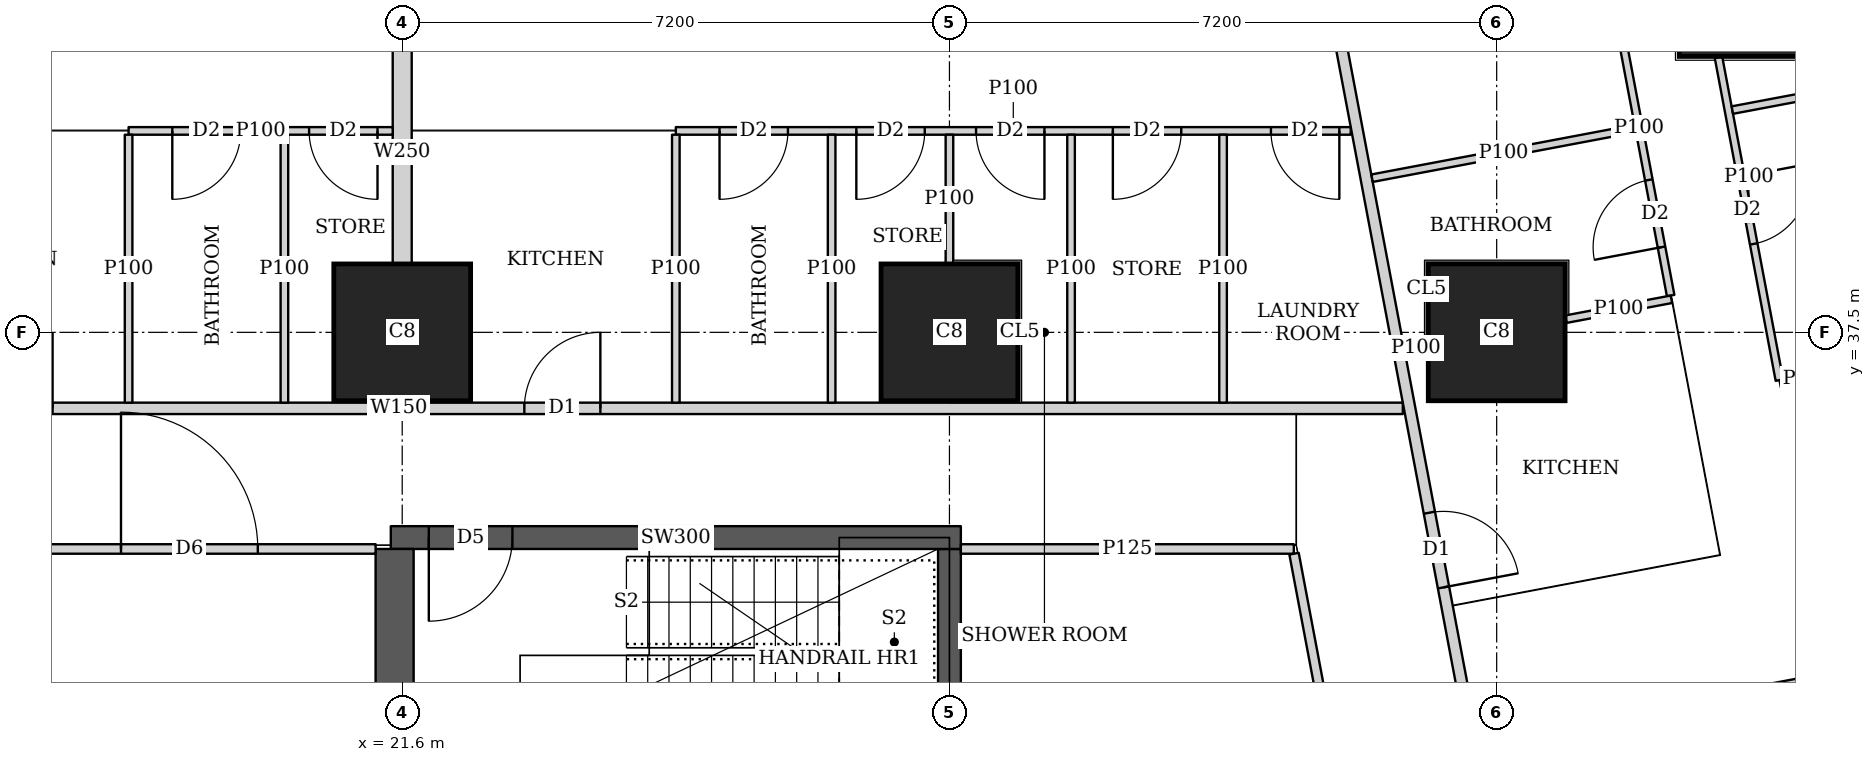
"""IFC4 building model, lengths in metres.
Left out: names, types, materials, properties, quantities, classifications, styles, units other than length and angle.
Written with IfcOpenShell. Run it as: python <this file> out.ifc"""

import sys

from ifc_helpers import new_model, si_unit, direction, frame, frame_2d, origin, origin_2d, place, context, subcontext, project, spatial, rectangle, extrude, element, fill, save


model = new_model("IFC4")
c1 = context("Model", 3, precision=1e-05, world=origin(), true_north=direction((0.0, 1.0)))
c2 = subcontext(c1, "Body", "Model", "MODEL_VIEW")
j1 = project(units=[si_unit("LENGTHUNIT", "METRE"), si_unit("PLANEANGLEUNIT", "RADIAN")], contexts=[c1])
p1 = place(None, origin())
s1 = spatial("IfcSite", under=j1, at=p1, CompositionType="ELEMENT")
p2 = place(p1, origin())
s2 = spatial("IfcBuilding", under=s1, at=p2, CompositionType="ELEMENT")
p3 = place(p2, frame((0.0, 0.0, 20.0)))
s3 = spatial("IfcBuildingStorey", under=s2, at=p3, CompositionType="ELEMENT", Elevation=20.0)
for number, where, z_axis, x_axis in (
    (1, (21.6, 37.5, 0.0), (0.0, 0.0, 1.0), (1.0, 0.0, 0.0)),
    (2, (28.8, 37.5, 0.0), (0.0, 0.0, 1.0), (1.0, 0.0, 0.0)),
    (3, (36.0, 37.5, 0.0), (0.0, 0.0, 1.0), (1.0, 0.0, 0.0)),
):
    element("IfcColumn", number, at=place(p3, frame(where, z_axis=z_axis, x_axis=x_axis)), inside=s3, PredefinedType="COLUMN", context=c2, shape_type="SweptSolid", body=[
        extrude(rectangle(XDim=1.8, YDim=1.8, at=origin_2d()), origin(), (0.0, 0.0, 1.0), 3.75),
    ])
p4 = place(p3, frame((40.102, 42.83, 0.0), z_axis=(0.0, 0.0, 1.0), x_axis=(1.0, 0.0, 0.0)))
e4 = element("IfcColumn", 4, at=p4, inside=s3, PredefinedType="COLUMN", context=c2, shape_type="SweptSolid", body=[
    extrude(rectangle(XDim=3.4, YDim=3.4, at=origin_2d()), origin(), (0.0, 0.0, 1.0), 3.75),
])
p5 = place(p3, frame((21.45, 34.8, 0.0), z_axis=(0.0, 0.0, 1.0), x_axis=(1.0, 0.0, 0.0)))
e5 = element("IfcWall", 5, at=p5, inside=s3, PredefinedType="SHEAR", context=c2, shape_type="SweptSolid", body=[
    extrude(rectangle(XDim=7.5, YDim=0.3, at=frame_2d((3.75, 0.0))), origin(), (0.0, 0.0, 1.0), 3.75),
])
p6 = place(p5, frame((0.5, 0.0, 0.0)))
e6 = element("IfcOpeningElement", 6, at=p6, cuts=e5, PredefinedType="OPENING", context=c2, shape_type="SweptSolid", body=[
    extrude(rectangle(XDim=1.1, YDim=2.1, at=frame_2d((0.55, 1.05))), frame((0.0, 0.16, 0.0), z_axis=(0.0, -1.0, 0.0), x_axis=(1.0, 0.0, 0.0)), (0.0, 0.0, 1.0), 0.32),
])
p7 = place(p3, frame((21.5, 30.45, 0.0), z_axis=(0.0, 0.0, 1.0), x_axis=(0.0, 1.0, 0.0)))
e7 = element("IfcWall", 7, at=p7, inside=s3, PredefinedType="SHEAR", context=c2, shape_type="SweptSolid", body=[
    extrude(rectangle(XDim=4.2, YDim=0.5, at=frame_2d((2.1, 0.0))), origin(), (0.0, 0.0, 1.0), 3.75),
])
p8 = place(p3, frame((28.8, 30.45, 0.0), z_axis=(0.0, 0.0, 1.0), x_axis=(0.0, 1.0, 0.0)))
e8 = element("IfcWall", 8, at=p8, inside=s3, PredefinedType="SHEAR", context=c2, shape_type="SweptSolid", body=[
    extrude(rectangle(XDim=4.2, YDim=0.3, at=frame_2d((2.1, 0.0))), origin(), (0.0, 0.0, 1.0), 3.75),
])
p9 = place(p3, frame((8.35, 36.5, 0.0), z_axis=(0.0, 0.0, 1.0), x_axis=(1.0, 0.0, 0.0)))
e9 = element("IfcWall", 9, at=p9, inside=s3, PredefinedType="SOLIDWALL", context=c2, shape_type="SweptSolid", body=[
    extrude(rectangle(XDim=26.415, YDim=0.15, at=frame_2d((13.208, 0.0))), origin(), (0.0, 0.0, 1.0), 3.5),
])
p10 = place(p9, frame((3.383, 0.0, 0.0)))
e10 = element("IfcOpeningElement", 10, at=p10, cuts=e9, PredefinedType="OPENING", context=c2, shape_type="SweptSolid", body=[
    extrude(rectangle(XDim=1.0, YDim=2.1, at=frame_2d((0.5, 1.05))), frame((0.0, 0.085, 0.0), z_axis=(0.0, -1.0, 0.0), x_axis=(1.0, 0.0, 0.0)), (0.0, 0.0, 1.0), 0.17),
])
p11 = place(p9, frame((7.65, 0.0, 0.0)))
e11 = element("IfcOpeningElement", 11, at=p11, cuts=e9, PredefinedType="OPENING", context=c2, shape_type="SweptSolid", body=[
    extrude(rectangle(XDim=1.0, YDim=2.1, at=frame_2d((0.5, 1.05))), frame((0.0, 0.085, 0.0), z_axis=(0.0, -1.0, 0.0), x_axis=(1.0, 0.0, 0.0)), (0.0, 0.0, 1.0), 0.17),
])
p12 = place(p9, frame((14.857, 0.0, 0.0)))
e12 = element("IfcOpeningElement", 12, at=p12, cuts=e9, PredefinedType="OPENING", context=c2, shape_type="SweptSolid", body=[
    extrude(rectangle(XDim=1.0, YDim=2.1, at=frame_2d((0.5, 1.05))), frame((0.0, 0.085, 0.0), z_axis=(0.0, -1.0, 0.0), x_axis=(1.0, 0.0, 0.0)), (0.0, 0.0, 1.0), 0.17),
])
p13 = place(p3, frame((33.755, 42.325, 0.0), z_axis=(0.0, 0.0, 1.0), x_axis=(0.185611461091, -0.982623216453, 0.0)))
e13 = element("IfcWall", 13, at=p13, inside=s3, PredefinedType="SOLIDWALL", context=c2, shape_type="SweptSolid", body=[
    extrude(rectangle(XDim=40.241, YDim=0.15, at=frame_2d((20.121, 0.0))), origin(), (0.0, 0.0, 1.0), 2.5),
])
p14 = place(p13, frame((7.325, 0.0, 0.0)))
e14 = element("IfcOpeningElement", 14, at=p14, cuts=e13, PredefinedType="OPENING", context=c2, shape_type="SweptSolid", body=[
    extrude(rectangle(XDim=1.0, YDim=2.1, at=frame_2d((0.5, 1.05))), frame((0.0, 0.085, 0.0), z_axis=(0.0, -1.0, 0.0), x_axis=(1.0, 0.0, 0.0)), (0.0, 0.0, 1.0), 0.17),
])
p15 = place(p13, frame((11.902, 0.0, 0.0)))
e15 = element("IfcOpeningElement", 15, at=p15, cuts=e13, PredefinedType="OPENING", context=c2, shape_type="SweptSolid", body=[
    extrude(rectangle(XDim=1.0, YDim=2.1, at=frame_2d((0.5, 1.05))), frame((0.0, 0.085, 0.0), z_axis=(0.0, -1.0, 0.0), x_axis=(1.0, 0.0, 0.0)), (0.0, 0.0, 1.0), 0.17),
])
p16 = place(p13, frame((25.718, 0.0, 0.0)))
e16 = element("IfcOpeningElement", 16, at=p16, cuts=e13, PredefinedType="OPENING", context=c2, shape_type="SweptSolid", body=[
    extrude(rectangle(XDim=1.0, YDim=2.1, at=frame_2d((0.5, 1.05))), frame((0.0, 0.085, 0.0), z_axis=(0.0, -1.0, 0.0), x_axis=(1.0, 0.0, 0.0)), (0.0, 0.0, 1.0), 0.17),
])
p17 = place(p13, frame((31.788, 0.0, 0.0)))
e17 = element("IfcOpeningElement", 17, at=p17, cuts=e13, PredefinedType="OPENING", context=c2, shape_type="SweptSolid", body=[
    extrude(rectangle(XDim=1.0, YDim=2.1, at=frame_2d((0.5, 1.05))), frame((0.0, 0.085, 0.0), z_axis=(0.0, -1.0, 0.0), x_axis=(1.0, 0.0, 0.0)), (0.0, 0.0, 1.0), 0.17),
])
p18 = place(p3, frame((38.918, 41.12, 0.0), z_axis=(0.0, 0.0, 1.0), x_axis=(0.185474723155, -0.982649035552, 0.0)))
e18 = element("IfcWall", 18, at=p18, inside=s3, PredefinedType="PARTITIONING", context=c2, shape_type="SweptSolid", body=[
    extrude(rectangle(XDim=4.324, YDim=0.1, at=frame_2d((2.162, 0.0))), origin(), (0.0, 0.0, 1.0), 3.5),
])
p19 = place(p18, frame((1.6, 0.0, 0.0)))
e19 = element("IfcOpeningElement", 19, at=p19, cuts=e18, PredefinedType="OPENING", context=c2, shape_type="SweptSolid", body=[
    extrude(rectangle(XDim=0.9, YDim=2.1, at=frame_2d((0.45, 1.05))), frame((0.0, 0.06, 0.0), z_axis=(0.0, -1.0, 0.0), x_axis=(1.0, 0.0, 0.0)), (0.0, 0.0, 1.0), 0.12),
])
p20 = place(p3, frame((37.457, 42.39, 0.0), z_axis=(0.0, 0.0, 1.0), x_axis=(0.185560627322, -0.982632817276, 0.0)))
e20 = element("IfcWall", 20, at=p20, inside=s3, PredefinedType="PARTITIONING", context=c2, shape_type="SweptSolid", body=[
    extrude(rectangle(XDim=4.484, YDim=0.1, at=frame_2d((2.242, 0.0))), origin(), (0.0, 0.0, 1.0), 3.5),
])
p21 = place(p20, frame((2.936, 0.0, 0.0)))
e21 = element("IfcOpeningElement", 21, at=p21, cuts=e20, PredefinedType="OPENING", context=c2, shape_type="SweptSolid", body=[
    extrude(rectangle(XDim=0.9, YDim=2.1, at=frame_2d((0.45, 1.05))), frame((0.0, 0.06, 0.0), z_axis=(0.0, -1.0, 0.0), x_axis=(1.0, 0.0, 0.0)), (0.0, 0.0, 1.0), 0.12),
])
p22 = place(p3, frame((43.277, 41.212, 0.0), z_axis=(0.0, 0.0, 1.0), x_axis=(-0.982665405803, -0.185387972203, 0.0)))
e22 = element("IfcWall", 22, at=p22, inside=s3, PredefinedType="PARTITIONING", context=c2, shape_type="SweptSolid", body=[
    extrude(rectangle(XDim=4.25, YDim=0.1, at=frame_2d((2.125, 0.0))), origin(), (0.0, 0.0, 1.0), 2.1),
])
p23 = place(p3, frame((40.454, 36.959, 0.0), z_axis=(0.0, 0.0, 1.0), x_axis=(-0.982578421631, -0.185848447247, 0.0)))
e23 = element("IfcWall", 23, at=p23, inside=s3, PredefinedType="PARTITIONING", context=c2, shape_type="SweptSolid", body=[
    extrude(rectangle(XDim=0.737, YDim=0.1, at=frame_2d((0.369, 0.0))), origin(), (0.0, 0.0, 1.0), 3.5),
])
p24 = place(p3, frame((37.823, 40.182, 0.0), z_axis=(0.0, 0.0, 1.0), x_axis=(-0.98263926043, -0.185526504472, 0.0)))
e24 = element("IfcWall", 24, at=p24, inside=s3, PredefinedType="PARTITIONING", context=c2, shape_type="SweptSolid", body=[
    extrude(rectangle(XDim=3.524, YDim=0.1, at=frame_2d((1.762, 0.0))), origin(), (0.0, 0.0, 1.0), 3.5),
])
p25 = place(p3, frame((38.299, 37.935, 0.0), z_axis=(0.0, 0.0, 1.0), x_axis=(-0.982680053146, -0.185310315822, 0.0)))
e25 = element("IfcWall", 25, at=p25, inside=s3, PredefinedType="PARTITIONING", context=c2, shape_type="SweptSolid", body=[
    extrude(rectangle(XDim=1.414, YDim=0.1, at=frame_2d((0.707, 0.0))), origin(), (0.0, 0.0, 1.0), 3.5),
])
p26 = place(p3, frame((35.09, 37.328, 0.0), z_axis=(0.0, 0.0, 1.0), x_axis=(-0.982961380226, -0.183812200315, 0.0)))
e26 = element("IfcWall", 26, at=p26, inside=s3, PredefinedType="PARTITIONING", context=c2, shape_type="SweptSolid", body=[
    extrude(rectangle(XDim=0.31, YDim=0.1, at=frame_2d((0.155, 0.0))), origin(), (0.0, 0.0, 1.0), 3.5),
])
p27 = place(p3, frame((40.468, 32.915, 0.0), z_axis=(0.0, 0.0, 1.0), x_axis=(-0.982635807605, -0.185544791394, 0.0)))
e27 = element("IfcWall", 27, at=p27, inside=s3, PredefinedType="SOLIDWALL", context=c2, shape_type="SweptSolid", body=[
    extrude(rectangle(XDim=4.775, YDim=0.25, at=frame_2d((2.388, 0.0))), origin(), (0.0, 0.0, 1.0), 3.5),
])
p28 = place(p3, frame((18.0, 40.15, 0.0), z_axis=(0.0, 0.0, 1.0), x_axis=(1.0, 0.0, 0.0)))
e28 = element("IfcWall", 28, at=p28, inside=s3, PredefinedType="PARTITIONING", context=c2, shape_type="SweptSolid", body=[
    extrude(rectangle(XDim=3.475, YDim=0.1, at=frame_2d((1.738, 0.0))), origin(), (0.0, 0.0, 1.0), 3.5),
])
p29 = place(p28, frame((0.575, 0.0, 0.0)))
e29 = element("IfcOpeningElement", 29, at=p29, cuts=e28, PredefinedType="OPENING", context=c2, shape_type="SweptSolid", body=[
    extrude(rectangle(XDim=0.9, YDim=2.1, at=frame_2d((0.45, 1.05))), frame((0.0, 0.06, 0.0), z_axis=(0.0, -1.0, 0.0), x_axis=(1.0, 0.0, 0.0)), (0.0, 0.0, 1.0), 0.12),
])
p30 = place(p28, frame((2.375, 0.0, 0.0)))
e30 = element("IfcOpeningElement", 30, at=p30, cuts=e28, PredefinedType="OPENING", context=c2, shape_type="SweptSolid", body=[
    extrude(rectangle(XDim=0.9, YDim=2.1, at=frame_2d((0.45, 1.05))), frame((0.0, 0.06, 0.0), z_axis=(0.0, -1.0, 0.0), x_axis=(1.0, 0.0, 0.0)), (0.0, 0.0, 1.0), 0.12),
])
for number, where, z_axis, x_axis in (
    (31, (18.0, 36.575, 0.0), (0.0, 0.0, 1.0), (0.0, 1.0, 0.0)),
    (32, (20.05, 36.575, 0.0), (0.0, 0.0, 1.0), (0.0, 1.0, 0.0)),
):
    element("IfcWall", number, at=place(p3, frame(where, z_axis=z_axis, x_axis=x_axis)), inside=s3, PredefinedType="PARTITIONING", context=c2, shape_type="SweptSolid", body=[
        extrude(rectangle(XDim=3.525, YDim=0.1, at=frame_2d((1.763, 0.0))), origin(), (0.0, 0.0, 1.0), 3.5),
    ])
p31 = place(p3, frame((25.2, 40.15, 0.0), z_axis=(0.0, 0.0, 1.0), x_axis=(1.0, 0.0, 0.0)))
e33 = element("IfcWall", 33, at=p31, inside=s3, PredefinedType="PARTITIONING", context=c2, shape_type="SweptSolid", body=[
    extrude(rectangle(XDim=8.88, YDim=0.1, at=frame_2d((4.44, 0.0))), origin(), (0.0, 0.0, 1.0), 3.5),
])
p32 = place(p31, frame((0.575, 0.0, 0.0)))
e34 = element("IfcOpeningElement", 34, at=p32, cuts=e33, PredefinedType="OPENING", context=c2, shape_type="SweptSolid", body=[
    extrude(rectangle(XDim=0.9, YDim=2.1, at=frame_2d((0.45, 1.05))), frame((0.0, 0.06, 0.0), z_axis=(0.0, -1.0, 0.0), x_axis=(1.0, 0.0, 0.0)), (0.0, 0.0, 1.0), 0.12),
])
p33 = place(p31, frame((3.95, 0.0, 0.0)))
e35 = element("IfcOpeningElement", 35, at=p33, cuts=e33, PredefinedType="OPENING", context=c2, shape_type="SweptSolid", body=[
    extrude(rectangle(XDim=0.9, YDim=2.1, at=frame_2d((0.45, 1.05))), frame((0.0, 0.06, 0.0), z_axis=(0.0, -1.0, 0.0), x_axis=(1.0, 0.0, 0.0)), (0.0, 0.0, 1.0), 0.12),
])
p34 = place(p31, frame((7.83, 0.0, 0.0)))
e36 = element("IfcOpeningElement", 36, at=p34, cuts=e33, PredefinedType="OPENING", context=c2, shape_type="SweptSolid", body=[
    extrude(rectangle(XDim=0.9, YDim=2.1, at=frame_2d((0.45, 1.05))), frame((0.0, 0.06, 0.0), z_axis=(0.0, -1.0, 0.0), x_axis=(1.0, 0.0, 0.0)), (0.0, 0.0, 1.0), 0.12),
])
p35 = place(p31, frame((2.375, 0.0, 0.0)))
e37 = element("IfcOpeningElement", 37, at=p35, cuts=e33, PredefinedType="OPENING", context=c2, shape_type="SweptSolid", body=[
    extrude(rectangle(XDim=0.9, YDim=2.1, at=frame_2d((0.45, 1.05))), frame((0.0, 0.06, 0.0), z_axis=(0.0, -1.0, 0.0), x_axis=(1.0, 0.0, 0.0)), (0.0, 0.0, 1.0), 0.12),
])
p36 = place(p31, frame((5.75, 0.0, 0.0)))
e38 = element("IfcOpeningElement", 38, at=p36, cuts=e33, PredefinedType="OPENING", context=c2, shape_type="SweptSolid", body=[
    extrude(rectangle(XDim=0.9, YDim=2.1, at=frame_2d((0.45, 1.05))), frame((0.0, 0.06, 0.0), z_axis=(0.0, -1.0, 0.0), x_axis=(1.0, 0.0, 0.0)), (0.0, 0.0, 1.0), 0.12),
])
p37 = place(p3, frame((25.2, 36.575, 0.0), z_axis=(0.0, 0.0, 1.0), x_axis=(0.0, 1.0, 0.0)))
e39 = element("IfcWall", 39, at=p37, inside=s3, PredefinedType="PARTITIONING", context=c2, shape_type="SweptSolid", body=[
    extrude(rectangle(XDim=3.525, YDim=0.1, at=frame_2d((1.763, 0.0))), origin(), (0.0, 0.0, 1.0), 3.5),
])
p38 = place(p3, frame((28.8, 38.401, 0.0), z_axis=(0.0, 0.0, 1.0), x_axis=(0.0, 1.0, 0.0)))
e40 = element("IfcWall", 40, at=p38, inside=s3, PredefinedType="PARTITIONING", context=c2, shape_type="SweptSolid", body=[
    extrude(rectangle(XDim=1.699, YDim=0.1, at=frame_2d((0.85, 0.0))), origin(), (0.0, 0.0, 1.0), 3.5),
])
for number, where, z_axis, x_axis in (
    (41, (32.4, 36.575, 0.0), (0.0, 0.0, 1.0), (0.0, 1.0, 0.0)),
    (42, (27.25, 36.575, 0.0), (0.0, 0.0, 1.0), (0.0, 1.0, 0.0)),
    (43, (30.4, 36.575, 0.0), (0.0, 0.0, 1.0), (0.0, 1.0, 0.0)),
):
    element("IfcWall", number, at=place(p3, frame(where, z_axis=z_axis, x_axis=x_axis)), inside=s3, PredefinedType="PARTITIONING", context=c2, shape_type="SweptSolid", body=[
        extrude(rectangle(XDim=3.525, YDim=0.1, at=frame_2d((1.763, 0.0))), origin(), (0.0, 0.0, 1.0), 3.5),
    ])
p39 = place(p3, frame((21.6, 38.401, 0.0), z_axis=(0.0, 0.0, 1.0), x_axis=(0.0, 1.0, 0.0)))
e44 = element("IfcWall", 44, at=p39, inside=s3, PredefinedType="SOLIDWALL", context=c2, shape_type="SweptSolid", body=[
    extrude(rectangle(XDim=2.949, YDim=0.25, at=frame_2d((1.475, 0.0))), origin(), (0.0, 0.0, 1.0), 3.5),
])
p40 = place(p3, frame((10.413, 34.65, 0.0), z_axis=(0.0, 0.0, 1.0), x_axis=(1.0, 0.0, 0.0)))
e45 = element("IfcWall", 45, at=p40, inside=s3, PredefinedType="PARTITIONING", context=c2, shape_type="SweptSolid", body=[
    extrude(rectangle(XDim=10.837, YDim=0.125, at=frame_2d((5.418, 0.0))), origin(), (0.0, 0.0, 1.0), 3.5),
])
p41 = place(p40, frame((7.487, 0.0, 0.0)))
e46 = element("IfcOpeningElement", 46, at=p41, cuts=e45, PredefinedType="OPENING", context=c2, shape_type="SweptSolid", body=[
    extrude(rectangle(XDim=1.8, YDim=2.1, at=frame_2d((0.9, 1.05))), frame((0.0, 0.073, 0.0), z_axis=(0.0, -1.0, 0.0), x_axis=(1.0, 0.0, 0.0)), (0.0, 0.0, 1.0), 0.145),
])
p42 = place(p3, frame((28.95, 34.65, 0.0), z_axis=(0.0, 0.0, 1.0), x_axis=(1.0, 0.0, 0.0)))
e47 = element("IfcWall", 47, at=p42, inside=s3, PredefinedType="PARTITIONING", context=c2, shape_type="SweptSolid", body=[
    extrude(rectangle(XDim=4.381, YDim=0.125, at=frame_2d((2.19, 0.0))), origin(), (0.0, 0.0, 1.0), 3.5),
])
p43 = place(p3, frame((34.193, 30.04, 0.0), z_axis=(0.0, 0.0, 1.0), x_axis=(-0.185626015863, 0.982620467034, 0.0)))
e48 = element("IfcWall", 48, at=p43, inside=s3, PredefinedType="PARTITIONING", context=c2, shape_type="SweptSolid", body=[
    extrude(rectangle(XDim=4.628, YDim=0.125, at=frame_2d((2.314, 0.0))), origin(), (0.0, 0.0, 1.0), 2.5),
])
p44 = place(p43, frame((1.15, 0.0, 0.0)))
e49 = element("IfcOpeningElement", 49, at=p44, cuts=e48, PredefinedType="OPENING", context=c2, shape_type="SweptSolid", body=[
    extrude(rectangle(XDim=1.0, YDim=2.1, at=frame_2d((0.5, 1.05))), frame((0.0, 0.073, 0.0), z_axis=(0.0, -1.0, 0.0), x_axis=(1.0, 0.0, 0.0)), (0.0, 0.0, 1.0), 0.145),
])
p45 = place(p19, origin())
e50 = element("IfcDoor", 50, at=p45, inside=s3, OperationType="SINGLE_SWING_LEFT", PredefinedType="DOOR", context=c2, shape_type="SweptSolid", body=[
    extrude(rectangle(XDim=0.9, YDim=2.1, at=frame_2d((0.45, 1.05))), frame((0.0, 0.025, 0.0), z_axis=(0.0, -1.0, 0.0), x_axis=(1.0, 0.0, 0.0)), (0.0, 0.0, 1.0), 0.05),
])
fill(e19, e50)
p46 = place(p21, origin())
e51 = element("IfcDoor", 51, at=p46, inside=s3, OperationType="SINGLE_SWING_LEFT", PredefinedType="DOOR", context=c2, shape_type="SweptSolid", body=[
    extrude(rectangle(XDim=0.9, YDim=2.1, at=frame_2d((0.45, 1.05))), frame((0.0, 0.025, 0.0), z_axis=(0.0, -1.0, 0.0), x_axis=(1.0, 0.0, 0.0)), (0.0, 0.0, 1.0), 0.05),
])
fill(e21, e51)
p47 = place(p14, origin())
e52 = element("IfcDoor", 52, at=p47, inside=s3, OperationType="SINGLE_SWING_RIGHT", PredefinedType="DOOR", context=c2, shape_type="SweptSolid", body=[
    extrude(rectangle(XDim=1.0, YDim=2.1, at=frame_2d((0.5, 1.05))), frame((0.0, 0.025, 0.0), z_axis=(0.0, -1.0, 0.0), x_axis=(1.0, 0.0, 0.0)), (0.0, 0.0, 1.0), 0.05),
])
fill(e14, e52)
p48 = place(p29, origin())
e53 = element("IfcDoor", 53, at=p48, inside=s3, OperationType="SINGLE_SWING_RIGHT", PredefinedType="DOOR", context=c2, shape_type="SweptSolid", body=[
    extrude(rectangle(XDim=0.9, YDim=2.1, at=frame_2d((0.45, 1.05))), frame((0.0, 0.025, 0.0), z_axis=(0.0, -1.0, 0.0), x_axis=(1.0, 0.0, 0.0)), (0.0, 0.0, 1.0), 0.05),
])
fill(e29, e53)
p49 = place(p30, origin())
e54 = element("IfcDoor", 54, at=p49, inside=s3, OperationType="SINGLE_SWING_LEFT", PredefinedType="DOOR", context=c2, shape_type="SweptSolid", body=[
    extrude(rectangle(XDim=0.9, YDim=2.1, at=frame_2d((0.45, 1.05))), frame((0.0, 0.025, 0.0), z_axis=(0.0, -1.0, 0.0), x_axis=(1.0, 0.0, 0.0)), (0.0, 0.0, 1.0), 0.05),
])
fill(e30, e54)
p50 = place(p32, origin())
e55 = element("IfcDoor", 55, at=p50, inside=s3, OperationType="SINGLE_SWING_RIGHT", PredefinedType="DOOR", context=c2, shape_type="SweptSolid", body=[
    extrude(rectangle(XDim=0.9, YDim=2.1, at=frame_2d((0.45, 1.05))), frame((0.0, 0.025, 0.0), z_axis=(0.0, -1.0, 0.0), x_axis=(1.0, 0.0, 0.0)), (0.0, 0.0, 1.0), 0.05),
])
fill(e34, e55)
p51 = place(p33, origin())
e56 = element("IfcDoor", 56, at=p51, inside=s3, OperationType="SINGLE_SWING_LEFT", PredefinedType="DOOR", context=c2, shape_type="SweptSolid", body=[
    extrude(rectangle(XDim=0.9, YDim=2.1, at=frame_2d((0.45, 1.05))), frame((0.0, 0.025, 0.0), z_axis=(0.0, -1.0, 0.0), x_axis=(1.0, 0.0, 0.0)), (0.0, 0.0, 1.0), 0.05),
])
fill(e35, e56)
p52 = place(p34, origin())
e57 = element("IfcDoor", 57, at=p52, inside=s3, OperationType="SINGLE_SWING_LEFT", PredefinedType="DOOR", context=c2, shape_type="SweptSolid", body=[
    extrude(rectangle(XDim=0.9, YDim=2.1, at=frame_2d((0.45, 1.05))), frame((0.0, 0.025, 0.0), z_axis=(0.0, -1.0, 0.0), x_axis=(1.0, 0.0, 0.0)), (0.0, 0.0, 1.0), 0.05),
])
fill(e36, e57)
p53 = place(p35, origin())
e58 = element("IfcDoor", 58, at=p53, inside=s3, OperationType="SINGLE_SWING_RIGHT", PredefinedType="DOOR", context=c2, shape_type="SweptSolid", body=[
    extrude(rectangle(XDim=0.9, YDim=2.1, at=frame_2d((0.45, 1.05))), frame((0.0, 0.025, 0.0), z_axis=(0.0, -1.0, 0.0), x_axis=(1.0, 0.0, 0.0)), (0.0, 0.0, 1.0), 0.05),
])
fill(e37, e58)
p54 = place(p36, origin())
e59 = element("IfcDoor", 59, at=p54, inside=s3, OperationType="SINGLE_SWING_RIGHT", PredefinedType="DOOR", context=c2, shape_type="SweptSolid", body=[
    extrude(rectangle(XDim=0.9, YDim=2.1, at=frame_2d((0.45, 1.05))), frame((0.0, 0.025, 0.0), z_axis=(0.0, -1.0, 0.0), x_axis=(1.0, 0.0, 0.0)), (0.0, 0.0, 1.0), 0.05),
])
fill(e38, e59)
p55 = place(p12, origin())
e60 = element("IfcDoor", 60, at=p55, inside=s3, OperationType="SINGLE_SWING_RIGHT", PredefinedType="DOOR", context=c2, shape_type="SweptSolid", body=[
    extrude(rectangle(XDim=1.0, YDim=2.1, at=frame_2d((0.5, 1.05))), frame((0.0, 0.025, 0.0), z_axis=(0.0, -1.0, 0.0), x_axis=(1.0, 0.0, 0.0)), (0.0, 0.0, 1.0), 0.05),
])
fill(e12, e60)
p56 = place(p41, origin())
e61 = element("IfcDoor", 61, at=p56, inside=s3, OperationType="DOUBLE_DOOR_SINGLE_SWING", PredefinedType="DOOR", context=c2, shape_type="SweptSolid", body=[
    extrude(rectangle(XDim=1.8, YDim=2.1, at=frame_2d((0.9, 1.05))), frame((0.0, 0.025, 0.0), z_axis=(0.0, -1.0, 0.0), x_axis=(1.0, 0.0, 0.0)), (0.0, 0.0, 1.0), 0.05),
])
fill(e46, e61)
p57 = place(p6, origin())
e62 = element("IfcDoor", 62, at=p57, inside=s3, OperationType="SINGLE_SWING_RIGHT", PredefinedType="DOOR", context=c2, shape_type="SweptSolid", body=[
    extrude(rectangle(XDim=1.1, YDim=2.1, at=frame_2d((0.55, 1.05))), frame((0.0, 0.025, 0.0), z_axis=(0.0, -1.0, 0.0), x_axis=(1.0, 0.0, 0.0)), (0.0, 0.0, 1.0), 0.05),
])
fill(e6, e62)
save(model, sys.argv[1])
